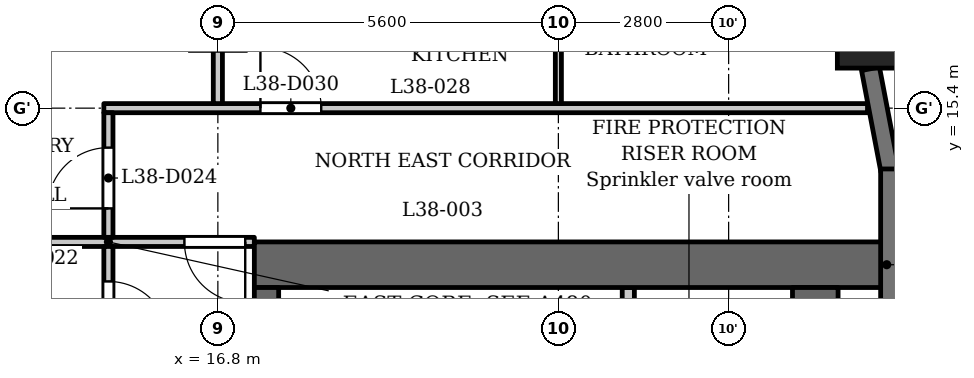
"""IFC4 building model, lengths in metres.
Left out: names, types, materials, properties, quantities, classifications, styles, units other than length and angle.
Written with IfcOpenShell. Run it as: python <this file> out.ifc"""

import sys

from ifc_helpers import new_model, si_unit, direction, frame, frame_2d, origin, origin_2d, place, context, subcontext, project, spatial, rectangle, extrude, element, fill, save


model = new_model("IFC4")
c1 = context("Model", 3, precision=1e-05, world=origin(), true_north=direction((0.0, 1.0)))
c2 = subcontext(c1, "Body", "Model", "MODEL_VIEW")
j1 = project(units=[si_unit("LENGTHUNIT", "METRE"), si_unit("PLANEANGLEUNIT", "RADIAN")], contexts=[c1])
p1 = place(None, origin())
s1 = spatial("IfcSite", under=j1, at=p1, CompositionType="ELEMENT")
p2 = place(p1, origin())
s2 = spatial("IfcBuilding", under=s1, at=p2, CompositionType="ELEMENT")
p3 = place(p2, frame((0.0, 0.0, 150.1)))
s3 = spatial("IfcBuildingStorey", under=s2, at=p3, CompositionType="ELEMENT", Elevation=150.1)
p4 = place(p3, frame((27.538, 16.609, 0.0), z_axis=(0.0, 0.0, 1.0), x_axis=(1.0, 0.0, 0.0)))
e1 = element("IfcColumn", 1, at=p4, inside=s3, PredefinedType="COLUMN", context=c2, shape_type="SweptSolid", body=[
    extrude(rectangle(XDim=1.1, YDim=1.1, at=origin_2d()), origin(), (0.0, 0.0, 1.0), 3.5),
])
p5 = place(p3, frame((27.85, 11.75, 0.0), z_axis=(0.0, 0.0, 1.0), x_axis=(0.0, 1.0, 0.0)))
e2 = element("IfcWall", 2, at=p5, inside=s3, PredefinedType="SOLIDWALL", context=c2, shape_type="SweptSolid", body=[
    extrude(rectangle(XDim=2.65, YDim=0.3, at=frame_2d((1.325, 0.0))), origin(), (0.0, 0.0, 1.0), 2.45),
])
p6 = place(p3, frame((27.853, 14.372, 0.0), z_axis=(0.0, 0.0, 1.0), x_axis=(-0.187302784601, 0.982302227871, 0.0)))
e3 = element("IfcWall", 3, at=p6, inside=s3, PredefinedType="SOLIDWALL", context=c2, shape_type="SweptSolid", body=[
    extrude(rectangle(XDim=1.706, YDim=0.3, at=frame_2d((0.853, 0.0))), origin(), (0.0, 0.0, 1.0), 2.45),
])
p7 = place(p3, frame((17.4, 12.825, 0.0), z_axis=(0.0, 0.0, 1.0), x_axis=(1.0, 0.0, 0.0)))
e4 = element("IfcWall", 4, at=p7, inside=s3, PredefinedType="SHEAR", context=c2, shape_type="SweptSolid", body=[
    extrude(rectangle(XDim=10.4, YDim=0.75, at=frame_2d((5.2, 0.0))), origin(), (0.0, 0.0, 1.0), 3.2),
])
p8 = place(p3, frame((17.6, -12.45, 0.0), z_axis=(0.0, 0.0, 1.0), x_axis=(0.0, 1.0, 0.0)))
e5 = element("IfcWall", 5, at=p8, inside=s3, PredefinedType="SHEAR", context=c2, shape_type="SweptSolid", body=[
    extrude(rectangle(XDim=24.9, YDim=0.4, at=frame_2d((12.45, 0.0))), origin(), (0.0, 0.0, 1.0), 3.2),
])
p9 = place(p8, frame((6.325, 0.0, 0.0)))
e6 = element("IfcOpeningElement", 6, at=p9, cuts=e5, PredefinedType="OPENING", context=c2, shape_type="SweptSolid", body=[
    extrude(rectangle(XDim=0.9, YDim=2.1, at=frame_2d((0.45, 1.05))), frame((0.0, 0.21, 0.0), z_axis=(0.0, -1.0, 0.0), x_axis=(1.0, 0.0, 0.0)), (0.0, 0.0, 1.0), 0.42),
])
p10 = place(p8, frame((9.925, 0.0, 0.0)))
e7 = element("IfcOpeningElement", 7, at=p10, cuts=e5, PredefinedType="OPENING", context=c2, shape_type="SweptSolid", body=[
    extrude(rectangle(XDim=0.9, YDim=2.1, at=frame_2d((0.45, 1.05))), frame((0.0, 0.21, 0.0), z_axis=(0.0, -1.0, 0.0), x_axis=(1.0, 0.0, 0.0)), (0.0, 0.0, 1.0), 0.42),
])
p11 = place(p8, frame((15.6, 0.0, 0.0)))
e8 = element("IfcOpeningElement", 8, at=p11, cuts=e5, PredefinedType="OPENING", context=c2, shape_type="SweptSolid", body=[
    extrude(rectangle(XDim=1.1, YDim=2.1, at=frame_2d((0.55, 1.05))), frame((0.0, 0.21, 0.0), z_axis=(0.0, -1.0, 0.0), x_axis=(1.0, 0.0, 0.0)), (0.0, 0.0, 1.0), 0.42),
])
p12 = place(p8, frame((18.0, 0.0, 0.0)))
e9 = element("IfcOpeningElement", 9, at=p12, cuts=e5, PredefinedType="OPENING", context=c2, shape_type="SweptSolid", body=[
    extrude(rectangle(XDim=1.1, YDim=2.1, at=frame_2d((0.55, 1.05))), frame((0.0, 0.21, 0.0), z_axis=(0.0, -1.0, 0.0), x_axis=(1.0, 0.0, 0.0)), (0.0, 0.0, 1.0), 0.42),
])
p13 = place(p8, frame((23.025, 0.0, 0.0)))
e10 = element("IfcOpeningElement", 10, at=p13, cuts=e5, PredefinedType="OPENING", context=c2, shape_type="SweptSolid", body=[
    extrude(rectangle(XDim=1.1, YDim=2.1, at=frame_2d((0.55, 1.05))), frame((0.0, 0.21, 0.0), z_axis=(0.0, -1.0, 0.0), x_axis=(1.0, 0.0, 0.0)), (0.0, 0.0, 1.0), 0.42),
])
p14 = place(p8, frame((0.775, 0.0, 0.0)))
e11 = element("IfcOpeningElement", 11, at=p14, cuts=e5, PredefinedType="OPENING", context=c2, shape_type="SweptSolid", body=[
    extrude(rectangle(XDim=1.1, YDim=2.1, at=frame_2d((0.55, 1.05))), frame((0.0, 0.21, 0.0), z_axis=(0.0, -1.0, 0.0), x_axis=(1.0, 0.0, 0.0)), (0.0, 0.0, 1.0), 0.42),
])
p15 = place(p8, frame((12.925, 0.0, 0.0)))
e12 = element("IfcOpeningElement", 12, at=p15, cuts=e5, PredefinedType="OPENING", context=c2, shape_type="SweptSolid", body=[
    extrude(rectangle(XDim=1.8, YDim=2.1, at=frame_2d((0.9, 1.05))), frame((0.0, 0.21, 0.0), z_axis=(0.0, -1.0, 0.0), x_axis=(1.0, 0.0, 0.0)), (0.0, 0.0, 1.0), 0.42),
])
p16 = place(p3, frame((26.625, -12.45, 0.0), z_axis=(0.0, 0.0, 1.0), x_axis=(0.0, 1.0, 0.0)))
e13 = element("IfcWall", 13, at=p16, inside=s3, PredefinedType="SHEAR", context=c2, shape_type="SweptSolid", body=[
    extrude(rectangle(XDim=24.9, YDim=0.75, at=frame_2d((12.45, 0.0))), origin(), (0.0, 0.0, 1.0), 3.2),
])
p17 = place(p3, frame((23.55, 9.8, 0.0), z_axis=(0.0, 0.0, 1.0), x_axis=(0.0, 1.0, 0.0)))
e14 = element("IfcWall", 14, at=p17, inside=s3, PredefinedType="PARTITIONING", context=c2, shape_type="SweptSolid", body=[
    extrude(rectangle(XDim=2.65, YDim=0.2, at=frame_2d((1.325, 0.0))), origin(), (0.0, 0.0, 1.0), 3.2),
])
p18 = place(p17, frame((0.875, 0.0, 0.0)))
e15 = element("IfcOpeningElement", 15, at=p18, cuts=e14, PredefinedType="OPENING", context=c2, shape_type="SweptSolid", body=[
    extrude(rectangle(XDim=0.9, YDim=2.1, at=frame_2d((0.45, 1.05))), frame((0.0, 0.11, 0.0), z_axis=(0.0, -1.0, 0.0), x_axis=(1.0, 0.0, 0.0)), (0.0, 0.0, 1.0), 0.22),
])
p19 = place(p3, frame((-17.4, 13.2, 0.0), z_axis=(0.0, 0.0, 1.0), x_axis=(1.0, 0.0, 0.0)))
e16 = element("IfcWall", 16, at=p19, inside=s3, PredefinedType="PARTITIONING", context=c2, shape_type="SweptSolid", body=[
    extrude(rectangle(XDim=34.8, YDim=0.15, at=frame_2d((17.4, 0.0))), origin(), (0.0, 0.0, 1.0), 3.2),
])
p20 = place(p19, frame((0.25, 0.0, 0.0)))
e17 = element("IfcOpeningElement", 17, at=p20, cuts=e16, PredefinedType="OPENING", context=c2, shape_type="SweptSolid", body=[
    extrude(rectangle(XDim=1.0, YDim=2.1, at=frame_2d((0.5, 1.05))), frame((0.0, 0.085, 0.0), z_axis=(0.0, -1.0, 0.0), x_axis=(1.0, 0.0, 0.0)), (0.0, 0.0, 1.0), 0.17),
])
p21 = place(p19, frame((33.65, 0.0, 0.0)))
e18 = element("IfcOpeningElement", 18, at=p21, cuts=e16, PredefinedType="OPENING", context=c2, shape_type="SweptSolid", body=[
    extrude(rectangle(XDim=1.0, YDim=2.1, at=frame_2d((0.5, 1.05))), frame((0.0, 0.085, 0.0), z_axis=(0.0, -1.0, 0.0), x_axis=(1.0, 0.0, 0.0)), (0.0, 0.0, 1.0), 0.17),
])
p22 = place(p19, frame((13.75, 0.0, 0.0)))
e19 = element("IfcOpeningElement", 19, at=p22, cuts=e16, PredefinedType="OPENING", context=c2, shape_type="SweptSolid", body=[
    extrude(rectangle(XDim=1.0, YDim=2.1, at=frame_2d((0.5, 1.05))), frame((0.0, 0.085, 0.0), z_axis=(0.0, -1.0, 0.0), x_axis=(1.0, 0.0, 0.0)), (0.0, 0.0, 1.0), 0.17),
])
p23 = place(p3, frame((14.925, 15.4, 0.0), z_axis=(0.0, 0.0, 1.0), x_axis=(1.0, 0.0, 0.0)))
e20 = element("IfcWall", 20, at=p23, inside=s3, PredefinedType="PARTITIONING", context=c2, shape_type="SweptSolid", body=[
    extrude(rectangle(XDim=12.559, YDim=0.15, at=frame_2d((6.279, 0.0))), origin(), (0.0, 0.0, 1.0), 3.2),
])
p24 = place(p23, frame((2.575, 0.0, 0.0)))
e21 = element("IfcOpeningElement", 21, at=p24, cuts=e20, PredefinedType="OPENING", context=c2, shape_type="SweptSolid", body=[
    extrude(rectangle(XDim=1.0, YDim=2.1, at=frame_2d((0.5, 1.05))), frame((0.0, 0.085, 0.0), z_axis=(0.0, -1.0, 0.0), x_axis=(1.0, 0.0, 0.0)), (0.0, 0.0, 1.0), 0.17),
])
p25 = place(p3, frame((15.0, 6.769, 0.0), z_axis=(0.0, 0.0, 1.0), x_axis=(0.0, 1.0, 0.0)))
e22 = element("IfcWall", 22, at=p25, inside=s3, PredefinedType="PARTITIONING", context=c2, shape_type="SweptSolid", body=[
    extrude(rectangle(XDim=6.356, YDim=0.15, at=frame_2d((3.178, 0.0))), origin(), (0.0, 0.0, 1.0), 3.2),
])
p26 = place(p25, frame((4.781, 0.0, 0.0)))
e23 = element("IfcOpeningElement", 23, at=p26, cuts=e22, PredefinedType="OPENING", context=c2, shape_type="SweptSolid", body=[
    extrude(rectangle(XDim=1.0, YDim=2.1, at=frame_2d((0.5, 1.05))), frame((0.0, 0.085, 0.0), z_axis=(0.0, -1.0, 0.0), x_axis=(1.0, 0.0, 0.0)), (0.0, 0.0, 1.0), 0.17),
])
p27 = place(p3, frame((15.0, 13.275, 0.0), z_axis=(0.0, 0.0, 1.0), x_axis=(0.0, 1.0, 0.0)))
e24 = element("IfcWall", 24, at=p27, inside=s3, PredefinedType="PARTITIONING", context=c2, shape_type="SweptSolid", body=[
    extrude(rectangle(XDim=2.05, YDim=0.15, at=frame_2d((1.025, 0.0))), origin(), (0.0, 0.0, 1.0), 3.2),
])
p28 = place(p27, frame((0.476, 0.0, 0.0)))
e25 = element("IfcOpeningElement", 25, at=p28, cuts=e24, PredefinedType="OPENING", context=c2, shape_type="SweptSolid", body=[
    extrude(rectangle(XDim=1.0, YDim=2.1, at=frame_2d((0.5, 1.05))), frame((0.0, 0.085, 0.0), z_axis=(0.0, -1.0, 0.0), x_axis=(1.0, 0.0, 0.0)), (0.0, 0.0, 1.0), 0.17),
])
p29 = place(p3, frame((16.8, 15.475, 0.0), z_axis=(0.0, 0.0, 1.0), x_axis=(0.0, 1.0, 0.0)))
e26 = element("IfcWall", 26, at=p29, inside=s3, PredefinedType="PARTITIONING", context=c2, shape_type="SweptSolid", body=[
    extrude(rectangle(XDim=7.455, YDim=0.15, at=frame_2d((3.728, 0.0))), origin(), (0.0, 0.0, 1.0), 3.2),
])
p30 = place(p3, frame((22.4, 15.475, 0.0), z_axis=(0.0, 0.0, 1.0), x_axis=(0.0, 1.0, 0.0)))
e27 = element("IfcWall", 27, at=p30, inside=s3, PredefinedType="PARTITIONING", context=c2, shape_type="SweptSolid", body=[
    extrude(rectangle(XDim=2.275, YDim=0.1, at=frame_2d((1.137, 0.0))), origin(), (0.0, 0.0, 1.0), 3.2),
])
p31 = place(p26, origin())
e28 = element("IfcDoor", 28, at=p31, inside=s3, OperationType="SINGLE_SWING_LEFT", PredefinedType="DOOR", context=c2, shape_type="SweptSolid", body=[
    extrude(rectangle(XDim=1.0, YDim=2.1, at=frame_2d((0.5, 1.05))), frame((0.0, 0.025, 0.0), z_axis=(0.0, -1.0, 0.0), x_axis=(1.0, 0.0, 0.0)), (0.0, 0.0, 1.0), 0.05),
])
fill(e23, e28)
p32 = place(p21, origin())
e29 = element("IfcDoor", 29, at=p32, inside=s3, OperationType="SINGLE_SWING_RIGHT", PredefinedType="DOOR", context=c2, shape_type="SweptSolid", body=[
    extrude(rectangle(XDim=1.0, YDim=2.1, at=frame_2d((0.5, 1.05))), frame((0.0, 0.025, 0.0), z_axis=(0.0, -1.0, 0.0), x_axis=(1.0, 0.0, 0.0)), (0.0, 0.0, 1.0), 0.05),
])
fill(e18, e29)
p33 = place(p28, origin())
e30 = element("IfcDoor", 30, at=p33, inside=s3, OperationType="SINGLE_SWING_RIGHT", PredefinedType="DOOR", context=c2, shape_type="SweptSolid", body=[
    extrude(rectangle(XDim=1.0, YDim=2.1, at=frame_2d((0.5, 1.05))), frame((0.0, 0.025, 0.0), z_axis=(0.0, -1.0, 0.0), x_axis=(1.0, 0.0, 0.0)), (0.0, 0.0, 1.0), 0.05),
])
fill(e25, e30)
p34 = place(p24, origin())
e31 = element("IfcDoor", 31, at=p34, inside=s3, OperationType="SINGLE_SWING_RIGHT", PredefinedType="DOOR", context=c2, shape_type="SweptSolid", body=[
    extrude(rectangle(XDim=1.0, YDim=2.1, at=frame_2d((0.5, 1.05))), frame((0.0, 0.025, 0.0), z_axis=(0.0, -1.0, 0.0), x_axis=(1.0, 0.0, 0.0)), (0.0, 0.0, 1.0), 0.05),
])
fill(e21, e31)
save(model, sys.argv[1])
